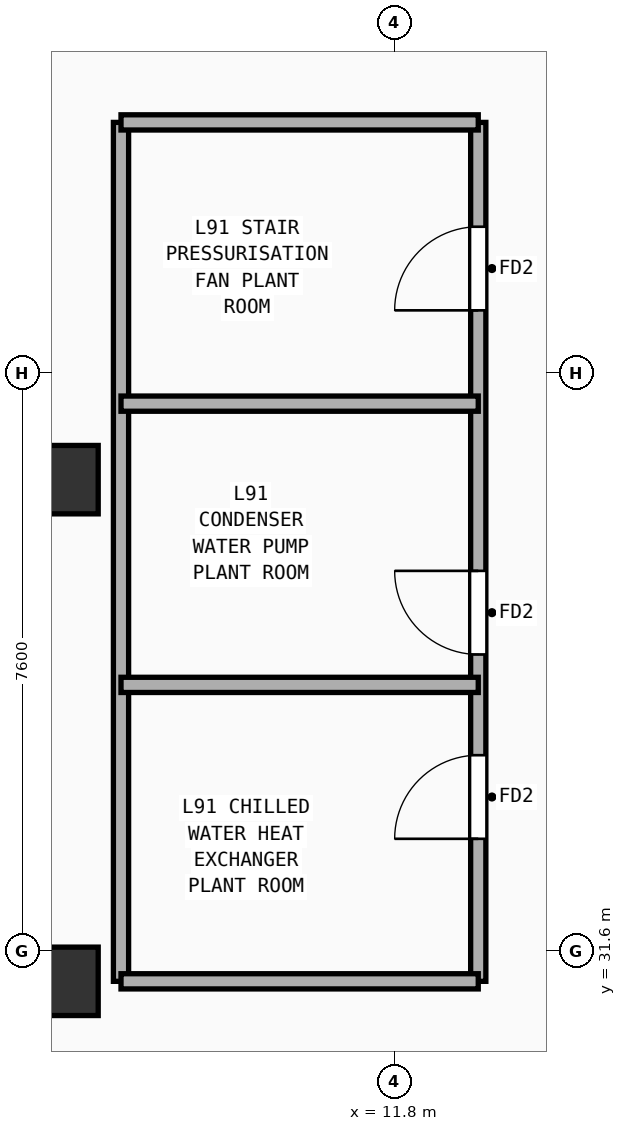
"""IFC4 building model, lengths in metres.
Left out: names, types, materials, properties, quantities, classifications, styles, units other than length and angle.
Written with IfcOpenShell. Run it as: python <this file> out.ifc"""

import sys

from ifc_helpers import new_model, si_unit, direction, frame, frame_2d, origin, origin_2d, place, context, subcontext, project, spatial, rectangle, extrude, element, fill, save


model = new_model("IFC4")
c1 = context("Model", 3, precision=1e-05, world=origin(), true_north=direction((0.0, 1.0)))
c2 = subcontext(c1, "Body", "Model", "MODEL_VIEW")
j1 = project(units=[si_unit("LENGTHUNIT", "METRE"), si_unit("PLANEANGLEUNIT", "RADIAN")], contexts=[c1])
p1 = place(None, origin())
s1 = spatial("IfcSite", under=j1, at=p1, CompositionType="ELEMENT")
p2 = place(p1, origin())
s2 = spatial("IfcBuilding", under=s1, at=p2, CompositionType="ELEMENT")
p3 = place(p2, frame((0.0, 0.0, 356.2)))
s3 = spatial("IfcBuildingStorey", under=s2, at=p3, CompositionType="ELEMENT", Elevation=356.2)
for number, where, z_axis, x_axis in (
    (1, (7.45, 31.2, 0.0), (0.0, 0.0, 1.0), (1.0, 0.0, 0.0)),
    (2, (7.45, 37.8, 0.0), (0.0, 0.0, 1.0), (1.0, 0.0, 0.0)),
):
    element("IfcColumn", number, at=place(p3, frame(where, z_axis=z_axis, x_axis=x_axis)), inside=s3, PredefinedType="COLUMN", context=c2, shape_type="SweptSolid", body=[
        extrude(rectangle(XDim=0.9, YDim=0.9, at=origin_2d()), origin(), (0.0, 0.0, 1.0), 3.82),
    ])
p4 = place(p3, frame((12.9, 31.2, 0.0), z_axis=(0.0, 0.0, 1.0), x_axis=(0.0, 1.0, 0.0)))
e3 = element("IfcWall", 3, at=p4, inside=s3, PredefinedType="PARTITIONING", context=c2, shape_type="SweptSolid", body=[
    extrude(rectangle(XDim=11.3, YDim=0.2, at=frame_2d((5.65, 0.0))), origin(), (0.0, 0.0, 1.0), 3.82),
])
p5 = place(p4, frame((1.875, 0.0, 0.0)))
e4 = element("IfcOpeningElement", 4, at=p5, cuts=e3, PredefinedType="OPENING", context=c2, shape_type="SweptSolid", body=[
    extrude(rectangle(XDim=1.1, YDim=2.2, at=frame_2d((0.55, 1.1))), frame((0.0, 0.11, 0.0), z_axis=(0.0, -1.0, 0.0), x_axis=(1.0, 0.0, 0.0)), (0.0, 0.0, 1.0), 0.22),
])
p6 = place(p4, frame((4.3, 0.0, 0.0)))
e5 = element("IfcOpeningElement", 5, at=p6, cuts=e3, PredefinedType="OPENING", context=c2, shape_type="SweptSolid", body=[
    extrude(rectangle(XDim=1.1, YDim=2.2, at=frame_2d((0.55, 1.1))), frame((0.0, 0.11, 0.0), z_axis=(0.0, -1.0, 0.0), x_axis=(1.0, 0.0, 0.0)), (0.0, 0.0, 1.0), 0.22),
])
p7 = place(p4, frame((8.827, 0.0, 0.0)))
e6 = element("IfcOpeningElement", 6, at=p7, cuts=e3, PredefinedType="OPENING", context=c2, shape_type="SweptSolid", body=[
    extrude(rectangle(XDim=1.1, YDim=2.2, at=frame_2d((0.55, 1.1))), frame((0.0, 0.11, 0.0), z_axis=(0.0, -1.0, 0.0), x_axis=(1.0, 0.0, 0.0)), (0.0, 0.0, 1.0), 0.22),
])
p8 = place(p3, frame((8.2, 31.2, 0.0), z_axis=(0.0, 0.0, 1.0), x_axis=(0.0, 1.0, 0.0)))
e7 = element("IfcWall", 7, at=p8, inside=s3, PredefinedType="PARTITIONING", context=c2, shape_type="SweptSolid", body=[
    extrude(rectangle(XDim=11.3, YDim=0.2, at=frame_2d((5.65, 0.0))), origin(), (0.0, 0.0, 1.0), 3.82),
])
p9 = place(p3, frame((8.2, 31.2, 0.0), z_axis=(0.0, 0.0, 1.0), x_axis=(1.0, 0.0, 0.0)))
e8 = element("IfcWall", 8, at=p9, inside=s3, PredefinedType="PARTITIONING", context=c2, shape_type="SweptSolid", body=[
    extrude(rectangle(XDim=4.7, YDim=0.2, at=frame_2d((2.35, 0.0))), origin(), (0.0, 0.0, 1.0), 3.22),
])
p10 = place(p3, frame((8.2, 42.5, 0.0), z_axis=(0.0, 0.0, 1.0), x_axis=(1.0, 0.0, 0.0)))
e9 = element("IfcWall", 9, at=p10, inside=s3, PredefinedType="PARTITIONING", context=c2, shape_type="SweptSolid", body=[
    extrude(rectangle(XDim=4.7, YDim=0.2, at=frame_2d((2.35, 0.0))), origin(), (0.0, 0.0, 1.0), 3.52),
])
for number, where, z_axis, x_axis in (
    (10, (8.2, 35.1, 0.0), (0.0, 0.0, 1.0), (1.0, 0.0, 0.0)),
    (11, (8.2, 38.8, 0.0), (0.0, 0.0, 1.0), (1.0, 0.0, 0.0)),
):
    element("IfcWall", number, at=place(p3, frame(where, z_axis=z_axis, x_axis=x_axis)), inside=s3, PredefinedType="PARTITIONING", context=c2, shape_type="SweptSolid", body=[
        extrude(rectangle(XDim=4.7, YDim=0.2, at=frame_2d((2.35, 0.0))), origin(), (0.0, 0.0, 1.0), 3.82),
    ])
p11 = place(p5, origin())
e12 = element("IfcDoor", 12, at=p11, inside=s3, OperationType="SINGLE_SWING_LEFT", PredefinedType="DOOR", context=c2, shape_type="SweptSolid", body=[
    extrude(rectangle(XDim=1.1, YDim=2.2, at=frame_2d((0.55, 1.1))), frame((0.0, 0.025, 0.0), z_axis=(0.0, -1.0, 0.0), x_axis=(1.0, 0.0, 0.0)), (0.0, 0.0, 1.0), 0.05),
])
fill(e4, e12)
p12 = place(p6, origin())
e13 = element("IfcDoor", 13, at=p12, inside=s3, OperationType="SINGLE_SWING_RIGHT", PredefinedType="DOOR", context=c2, shape_type="SweptSolid", body=[
    extrude(rectangle(XDim=1.1, YDim=2.2, at=frame_2d((0.55, 1.1))), frame((0.0, 0.025, 0.0), z_axis=(0.0, -1.0, 0.0), x_axis=(1.0, 0.0, 0.0)), (0.0, 0.0, 1.0), 0.05),
])
fill(e5, e13)
p13 = place(p7, origin())
e14 = element("IfcDoor", 14, at=p13, inside=s3, OperationType="SINGLE_SWING_LEFT", PredefinedType="DOOR", context=c2, shape_type="SweptSolid", body=[
    extrude(rectangle(XDim=1.1, YDim=2.2, at=frame_2d((0.55, 1.1))), frame((0.0, 0.025, 0.0), z_axis=(0.0, -1.0, 0.0), x_axis=(1.0, 0.0, 0.0)), (0.0, 0.0, 1.0), 0.05),
])
fill(e6, e14)
save(model, sys.argv[1])
